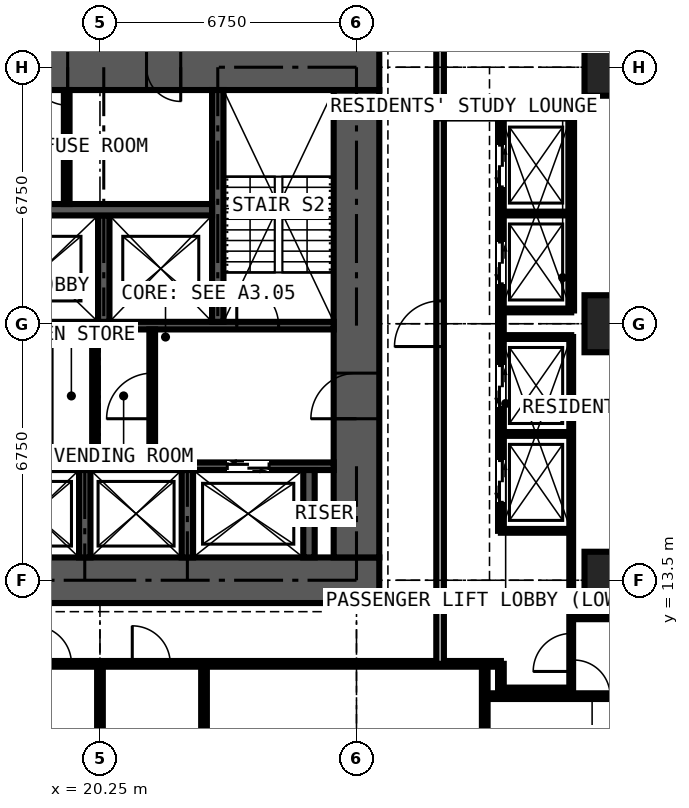
"""IFC4 building model, lengths in metres.
Left out: names, types, materials, properties, quantities, classifications, styles, units other than length and angle.
Written with IfcOpenShell. Run it as: python <this file> out.ifc"""

import sys

from ifc_helpers import new_model, si_unit, direction, frame, frame_2d, origin, origin_2d, place, context, subcontext, project, spatial, rectangle, extrude, element, fill, save


model = new_model("IFC4")
c1 = context("Model", 3, precision=1e-05, world=origin(), true_north=direction((0.0, 1.0)))
c2 = subcontext(c1, "Body", "Model", "MODEL_VIEW")
j1 = project(units=[si_unit("LENGTHUNIT", "METRE"), si_unit("PLANEANGLEUNIT", "RADIAN")], contexts=[c1])
p1 = place(None, origin())
s1 = spatial("IfcSite", under=j1, at=p1, CompositionType="ELEMENT")
p2 = place(p1, origin())
s2 = spatial("IfcBuilding", under=s1, at=p2, CompositionType="ELEMENT")
p3 = place(p2, frame((0.0, 0.0, 119.7)))
s3 = spatial("IfcBuildingStorey", under=s2, at=p3, CompositionType="ELEMENT", Elevation=119.7)
for number, where, z_axis, x_axis in (
    (1, (33.75, 13.5, 0.0), (0.0, 0.0, 1.0), (1.0, 0.0, 0.0)),
    (2, (33.75, 20.25, 0.0), (0.0, 0.0, 1.0), (1.0, 0.0, 0.0)),
    (3, (33.75, 27.0, 0.0), (0.0, 0.0, 1.0), (1.0, 0.0, 0.0)),
):
    element("IfcColumn", number, at=place(p3, frame(where, z_axis=z_axis, x_axis=x_axis)), inside=s3, PredefinedType="COLUMN", context=c2, shape_type="SweptSolid", body=[
        extrude(rectangle(XDim=1.5, YDim=1.5, at=origin_2d()), origin(), (0.0, 0.0, 1.0), 3.6),
    ])
p4 = place(p3, frame((12.9, 13.5, 0.0), z_axis=(0.0, 0.0, 1.0), x_axis=(1.0, 0.0, 0.0)))
e4 = element("IfcWall", 4, at=p4, inside=s3, PredefinedType="SHEAR", context=c2, shape_type="SweptSolid", body=[
    extrude(rectangle(XDim=14.7, YDim=1.2, at=frame_2d((7.35, 0.0))), origin(), (0.0, 0.0, 1.0), 3.6),
])
p5 = place(p3, frame((27.0, 14.1, 0.0), z_axis=(0.0, 0.0, 1.0), x_axis=(0.0, 1.0, 0.0)))
e5 = element("IfcWall", 5, at=p5, inside=s3, PredefinedType="SHEAR", context=c2, shape_type="SweptSolid", body=[
    extrude(rectangle(XDim=12.3, YDim=1.2, at=frame_2d((6.15, 0.0))), origin(), (0.0, 0.0, 1.0), 3.6),
])
p6 = place(p5, frame((3.65, 0.0, 0.0)))
e6 = element("IfcOpeningElement", 6, at=p6, cuts=e5, PredefinedType="OPENING", context=c2, shape_type="SweptSolid", body=[
    extrude(rectangle(XDim=1.2, YDim=2.2, at=frame_2d((0.6, 1.1))), frame((0.0, 0.61, 0.0), z_axis=(0.0, -1.0, 0.0), x_axis=(1.0, 0.0, 0.0)), (0.0, 0.0, 1.0), 1.22),
])
p7 = place(p3, frame((27.6, 27.0, 0.0), z_axis=(0.0, 0.0, 1.0), x_axis=(-1.0, 0.0, 0.0)))
e7 = element("IfcWall", 7, at=p7, inside=s3, PredefinedType="SHEAR", context=c2, shape_type="SweptSolid", body=[
    extrude(rectangle(XDim=14.7, YDim=1.2, at=frame_2d((7.35, 0.0))), origin(), (0.0, 0.0, 1.0), 3.6),
])
p8 = place(p7, frame((5.225, 0.0, 0.0)))
e8 = element("IfcOpeningElement", 8, at=p8, cuts=e7, PredefinedType="OPENING", context=c2, shape_type="SweptSolid", body=[
    extrude(rectangle(XDim=0.9, YDim=2.2, at=frame_2d((0.45, 1.1))), frame((0.0, 0.61, 0.0), z_axis=(0.0, -1.0, 0.0), x_axis=(1.0, 0.0, 0.0)), (0.0, 0.0, 1.0), 1.22),
])
p9 = place(p7, frame((8.2, 0.0, 0.0)))
e9 = element("IfcOpeningElement", 9, at=p9, cuts=e7, PredefinedType="OPENING", context=c2, shape_type="SweptSolid", body=[
    extrude(rectangle(XDim=1.0, YDim=2.2, at=frame_2d((0.5, 1.1))), frame((0.0, 0.61, 0.0), z_axis=(0.0, -1.0, 0.0), x_axis=(1.0, 0.0, 0.0)), (0.0, 0.0, 1.0), 1.22),
])
p10 = place(p3, frame((14.1, 16.5, 0.0), z_axis=(0.0, 0.0, 1.0), x_axis=(1.0, 0.0, 0.0)))
e10 = element("IfcWall", 10, at=p10, inside=s3, PredefinedType="SHEAR", context=c2, shape_type="SweptSolid", body=[
    extrude(rectangle(XDim=12.3, YDim=0.2, at=frame_2d((6.15, 0.0))), origin(), (0.0, 0.0, 1.0), 3.6),
])
p11 = place(p10, frame((0.9, 0.0, 0.0)))
e11 = element("IfcOpeningElement", 11, at=p11, cuts=e10, PredefinedType="OPENING", context=c2, shape_type="SweptSolid", body=[
    extrude(rectangle(XDim=1.1, YDim=2.2, at=frame_2d((0.55, 1.1))), frame((0.0, 0.11, 0.0), z_axis=(0.0, -1.0, 0.0), x_axis=(1.0, 0.0, 0.0)), (0.0, 0.0, 1.0), 0.22),
])
p12 = place(p10, frame((9.5, 0.0, 0.0)))
e12 = element("IfcOpeningElement", 12, at=p12, cuts=e10, PredefinedType="OPENING", context=c2, shape_type="SweptSolid", body=[
    extrude(rectangle(XDim=1.1, YDim=2.2, at=frame_2d((0.55, 1.1))), frame((0.0, 0.11, 0.0), z_axis=(0.0, -1.0, 0.0), x_axis=(1.0, 0.0, 0.0)), (0.0, 0.0, 1.0), 0.22),
])
p13 = place(p3, frame((14.1, 20.2, 0.0), z_axis=(0.0, 0.0, 1.0), x_axis=(1.0, 0.0, 0.0)))
e13 = element("IfcWall", 13, at=p13, inside=s3, PredefinedType="SHEAR", context=c2, shape_type="SweptSolid", body=[
    extrude(rectangle(XDim=12.3, YDim=0.2, at=frame_2d((6.15, 0.0))), origin(), (0.0, 0.0, 1.0), 3.6),
])
p14 = place(p13, frame((0.35, 0.0, 0.0)))
e14 = element("IfcOpeningElement", 14, at=p14, cuts=e13, PredefinedType="OPENING", context=c2, shape_type="SweptSolid", body=[
    extrude(rectangle(XDim=1.1, YDim=2.2, at=frame_2d((0.55, 1.1))), frame((0.0, 0.11, 0.0), z_axis=(0.0, -1.0, 0.0), x_axis=(1.0, 0.0, 0.0)), (0.0, 0.0, 1.0), 0.22),
])
p15 = place(p13, frame((9.75, 0.0, 0.0)))
e15 = element("IfcOpeningElement", 15, at=p15, cuts=e13, PredefinedType="OPENING", context=c2, shape_type="SweptSolid", body=[
    extrude(rectangle(XDim=1.1, YDim=2.2, at=frame_2d((0.55, 1.1))), frame((0.0, 0.11, 0.0), z_axis=(0.0, -1.0, 0.0), x_axis=(1.0, 0.0, 0.0)), (0.0, 0.0, 1.0), 0.22),
])
p16 = place(p3, frame((23.35, 20.3, 0.0), z_axis=(0.0, 0.0, 1.0), x_axis=(0.0, 1.0, 0.0)))
e16 = element("IfcWall", 16, at=p16, inside=s3, PredefinedType="SHEAR", context=c2, shape_type="SweptSolid", body=[
    extrude(rectangle(XDim=6.1, YDim=0.3, at=frame_2d((3.05, 0.0))), origin(), (0.0, 0.0, 1.0), 3.6),
])
p17 = place(p3, frame((20.35, 20.3, 0.0), z_axis=(0.0, 0.0, 1.0), x_axis=(0.0, 1.0, 0.0)))
e17 = element("IfcWall", 17, at=p17, inside=s3, PredefinedType="SHEAR", context=c2, shape_type="SweptSolid", body=[
    extrude(rectangle(XDim=2.8, YDim=0.3, at=frame_2d((1.4, 0.0))), origin(), (0.0, 0.0, 1.0), 3.6),
])
p18 = place(p3, frame((17.3, 23.25, 0.0), z_axis=(0.0, 0.0, 1.0), x_axis=(1.0, 0.0, 0.0)))
e18 = element("IfcWall", 18, at=p18, inside=s3, PredefinedType="SHEAR", context=c2, shape_type="SweptSolid", body=[
    extrude(rectangle(XDim=5.9, YDim=0.3, at=frame_2d((2.95, 0.0))), origin(), (0.0, 0.0, 1.0), 3.6),
])
for number, where, z_axis, x_axis in (
    (19, (19.85, 14.1, 0.0), (0.0, 0.0, 1.0), (0.0, 1.0, 0.0)),
    (20, (22.55, 14.1, 0.0), (0.0, 0.0, 1.0), (0.0, 1.0, 0.0)),
    (21, (25.75, 14.1, 0.0), (0.0, 0.0, 1.0), (0.0, 1.0, 0.0)),
):
    element("IfcWall", number, at=place(p3, frame(where, z_axis=z_axis, x_axis=x_axis)), inside=s3, PredefinedType="SHEAR", context=c2, shape_type="SweptSolid", body=[
        extrude(rectangle(XDim=2.3, YDim=0.3, at=frame_2d((1.15, 0.0))), origin(), (0.0, 0.0, 1.0), 3.6),
    ])
p19 = place(p3, frame((21.625, 16.6, 0.0), z_axis=(0.0, 0.0, 1.0), x_axis=(0.0, 1.0, 0.0)))
e22 = element("IfcWall", 22, at=p19, inside=s3, PredefinedType="PARTITIONING", context=c2, shape_type="SweptSolid", body=[
    extrude(rectangle(XDim=3.5, YDim=0.15, at=frame_2d((1.75, 0.0))), origin(), (0.0, 0.0, 1.0), 3.375),
])
p20 = place(p19, frame((1.15, 0.0, 0.0)))
e23 = element("IfcOpeningElement", 23, at=p20, cuts=e22, PredefinedType="OPENING", context=c2, shape_type="SweptSolid", body=[
    extrude(rectangle(XDim=1.2, YDim=2.2, at=frame_2d((0.6, 1.1))), frame((0.0, 0.085, 0.0), z_axis=(0.0, -1.0, 0.0), x_axis=(1.0, 0.0, 0.0)), (0.0, 0.0, 1.0), 0.17),
])
p21 = place(p3, frame((20.12, 16.6, 0.0), z_axis=(0.0, 0.0, 1.0), x_axis=(0.0, 1.0, 0.0)))
e24 = element("IfcWall", 24, at=p21, inside=s3, PredefinedType="PARTITIONING", context=c2, shape_type="SweptSolid", body=[
    extrude(rectangle(XDim=3.5, YDim=0.15, at=frame_2d((1.75, 0.0))), origin(), (0.0, 0.0, 1.0), 3.375),
])
p22 = place(p3, frame((19.375, 23.4, 0.0), z_axis=(0.0, 0.0, 1.0), x_axis=(0.0, 1.0, 0.0)))
e25 = element("IfcWall", 25, at=p22, inside=s3, PredefinedType="PARTITIONING", context=c2, shape_type="SweptSolid", body=[
    extrude(rectangle(XDim=3.0, YDim=0.15, at=frame_2d((1.5, 0.0))), origin(), (0.0, 0.0, 1.0), 3.375),
])
p23 = place(p3, frame((10.125, 11.3, 0.0), z_axis=(0.0, 0.0, 1.0), x_axis=(1.0, 0.0, 0.0)))
e26 = element("IfcWall", 26, at=p23, inside=s3, PredefinedType="PARTITIONING", context=c2, shape_type="SweptSolid", body=[
    extrude(rectangle(XDim=20.675, YDim=0.15, at=frame_2d((10.337, 0.0))), origin(), (0.0, 0.0, 1.0), 3.375),
])
p24 = place(p23, frame((8.375, 0.0, 0.0)))
e27 = element("IfcOpeningElement", 27, at=p24, cuts=e26, PredefinedType="OPENING", context=c2, shape_type="SweptSolid", body=[
    extrude(rectangle(XDim=1.0, YDim=2.2, at=frame_2d((0.5, 1.1))), frame((0.0, 0.085, 0.0), z_axis=(0.0, -1.0, 0.0), x_axis=(1.0, 0.0, 0.0)), (0.0, 0.0, 1.0), 0.17),
])
p25 = place(p23, frame((10.975, 0.0, 0.0)))
e28 = element("IfcOpeningElement", 28, at=p25, cuts=e26, PredefinedType="OPENING", context=c2, shape_type="SweptSolid", body=[
    extrude(rectangle(XDim=1.0, YDim=2.2, at=frame_2d((0.5, 1.1))), frame((0.0, 0.085, 0.0), z_axis=(0.0, -1.0, 0.0), x_axis=(1.0, 0.0, 0.0)), (0.0, 0.0, 1.0), 0.17),
])
p26 = place(p23, frame((3.925, 0.0, 0.0)))
e29 = element("IfcOpeningElement", 29, at=p26, cuts=e26, PredefinedType="OPENING", context=c2, shape_type="SweptSolid", body=[
    extrude(rectangle(XDim=0.95, YDim=2.2, at=frame_2d((0.475, 1.1))), frame((0.0, 0.085, 0.0), z_axis=(0.0, -1.0, 0.0), x_axis=(1.0, 0.0, 0.0)), (0.0, 0.0, 1.0), 0.17),
])
p27 = place(p3, frame((20.25, -0.734, 0.0), z_axis=(0.0, 0.0, 1.0), x_axis=(0.0, 1.0, 0.0)))
e30 = element("IfcWall", 30, at=p27, inside=s3, PredefinedType="PARTITIONING", context=c2, shape_type="SweptSolid", body=[
    extrude(rectangle(XDim=12.034, YDim=0.15, at=frame_2d((6.017, 0.0))), origin(), (0.0, 0.0, 1.0), 2.61),
])
p28 = place(p3, frame((22.988, 4.85, 0.0), z_axis=(0.0, 0.0, 1.0), x_axis=(0.0, 1.0, 0.0)))
e31 = element("IfcWall", 31, at=p28, inside=s3, PredefinedType="PARTITIONING", context=c2, shape_type="SweptSolid", body=[
    extrude(rectangle(XDim=6.45, YDim=0.15, at=frame_2d((3.225, 0.0))), origin(), (0.0, 0.0, 1.0), 3.375),
])
p29 = place(p28, frame((2.75, 0.0, 0.0)))
e32 = element("IfcOpeningElement", 32, at=p29, cuts=e31, PredefinedType="OPENING", context=c2, shape_type="SweptSolid", body=[
    extrude(rectangle(XDim=0.95, YDim=2.2, at=frame_2d((0.475, 1.1))), frame((0.0, 0.085, 0.0), z_axis=(0.0, -1.0, 0.0), x_axis=(1.0, 0.0, 0.0)), (0.0, 0.0, 1.0), 0.17),
])
p30 = place(p3, frame((29.2, 11.3, 0.0), z_axis=(0.0, 0.0, 1.0), x_axis=(0.0, 1.0, 0.0)))
e33 = element("IfcWall", 33, at=p30, inside=s3, PredefinedType="PARTITIONING", context=c2, shape_type="SweptSolid", body=[
    extrude(rectangle(XDim=17.9, YDim=0.2, at=frame_2d((8.95, 0.0))), origin(), (0.0, 0.0, 1.0), 3.375),
])
p31 = place(p30, frame((8.35, 0.0, 0.0)))
e34 = element("IfcOpeningElement", 34, at=p31, cuts=e33, PredefinedType="OPENING", context=c2, shape_type="SweptSolid", body=[
    extrude(rectangle(XDim=1.2, YDim=2.2, at=frame_2d((0.6, 1.1))), frame((0.0, 0.11, 0.0), z_axis=(0.0, -1.0, 0.0), x_axis=(1.0, 0.0, 0.0)), (0.0, 0.0, 1.0), 0.22),
])
p32 = place(p3, frame((29.2, 25.7, 0.0), z_axis=(0.0, 0.0, 1.0), x_axis=(1.0, 0.0, 0.0)))
e35 = element("IfcWall", 35, at=p32, inside=s3, PredefinedType="SHEAR", context=c2, shape_type="SweptSolid", body=[
    extrude(rectangle(XDim=3.45, YDim=0.1, at=frame_2d((1.725, 0.0))), origin(), (0.0, 0.0, 1.0), 3.375),
])
p33 = place(p3, frame((30.375, -0.734, 0.0), z_axis=(0.0, 0.0, 1.0), x_axis=(0.0, 1.0, 0.0)))
e36 = element("IfcWall", 36, at=p33, inside=s3, PredefinedType="PARTITIONING", context=c2, shape_type="SweptSolid", body=[
    extrude(rectangle(XDim=12.034, YDim=0.15, at=frame_2d((6.017, 0.0))), origin(), (0.0, 0.0, 1.0), 3.375),
])
p34 = place(p33, frame((4.884, 0.0, 0.0)))
e37 = element("IfcOpeningElement", 37, at=p34, cuts=e36, PredefinedType="OPENING", context=c2, shape_type="SweptSolid", body=[
    extrude(rectangle(XDim=1.0, YDim=2.2, at=frame_2d((0.5, 1.1))), frame((0.0, 0.085, 0.0), z_axis=(0.0, -1.0, 0.0), x_axis=(1.0, 0.0, 0.0)), (0.0, 0.0, 1.0), 0.17),
])
p35 = place(p3, frame((30.375, 10.45, 0.0), z_axis=(0.0, 0.0, 1.0), x_axis=(1.0, 0.0, 0.0)))
e38 = element("IfcWall", 38, at=p35, inside=s3, PredefinedType="PARTITIONING", context=c2, shape_type="SweptSolid", body=[
    extrude(rectangle(XDim=5.275, YDim=0.15, at=frame_2d((2.637, 0.0))), origin(), (0.0, 0.0, 1.0), 3.375),
])
p36 = place(p35, frame((2.35, 0.0, 0.0)))
e39 = element("IfcOpeningElement", 39, at=p36, cuts=e38, PredefinedType="OPENING", context=c2, shape_type="SweptSolid", body=[
    extrude(rectangle(XDim=0.95, YDim=2.2, at=frame_2d((0.475, 1.1))), frame((0.0, 0.085, 0.0), z_axis=(0.0, -1.0, 0.0), x_axis=(1.0, 0.0, 0.0)), (0.0, 0.0, 1.0), 0.17),
])
p37 = place(p3, frame((30.8, 10.6, 0.0), z_axis=(0.0, 0.0, 1.0), x_axis=(0.0, 1.0, 0.0)))
e40 = element("IfcWall", 40, at=p37, inside=s3, PredefinedType="PARTITIONING", context=c2, shape_type="SweptSolid", body=[
    extrude(rectangle(XDim=0.7, YDim=0.15, at=frame_2d((0.35, 0.0))), origin(), (0.0, 0.0, 1.0), 3.375),
])
p38 = place(p3, frame((30.8, 10.6, 0.0), z_axis=(0.0, 0.0, 1.0), x_axis=(1.0, 0.0, 0.0)))
e41 = element("IfcWall", 41, at=p38, inside=s3, PredefinedType="PARTITIONING", context=c2, shape_type="SweptSolid", body=[
    extrude(rectangle(XDim=1.85, YDim=0.15, at=frame_2d((0.925, 0.0))), origin(), (0.0, 0.0, 1.0), 3.375),
])
p39 = place(p3, frame((30.8, 14.8, 0.0), z_axis=(0.0, 0.0, 1.0), x_axis=(0.0, 1.0, 0.0)))
e42 = element("IfcWall", 42, at=p39, inside=s3, PredefinedType="PARTITIONING", context=c2, shape_type="SweptSolid", body=[
    extrude(rectangle(XDim=10.9, YDim=0.15, at=frame_2d((5.45, 0.0))), origin(), (0.0, 0.0, 1.0), 3.375),
])
p40 = place(p39, frame((0.75, 0.0, 0.0)))
e43 = element("IfcOpeningElement", 43, at=p40, cuts=e42, PredefinedType="OPENING", context=c2, shape_type="SweptSolid", body=[
    extrude(rectangle(XDim=1.1, YDim=2.2, at=frame_2d((0.55, 1.1))), frame((0.0, 0.085, 0.0), z_axis=(0.0, -1.0, 0.0), x_axis=(1.0, 0.0, 0.0)), (0.0, 0.0, 1.0), 0.17),
])
p41 = place(p39, frame((3.25, 0.0, 0.0)))
e44 = element("IfcOpeningElement", 44, at=p41, cuts=e42, PredefinedType="OPENING", context=c2, shape_type="SweptSolid", body=[
    extrude(rectangle(XDim=1.1, YDim=2.2, at=frame_2d((0.55, 1.1))), frame((0.0, 0.085, 0.0), z_axis=(0.0, -1.0, 0.0), x_axis=(1.0, 0.0, 0.0)), (0.0, 0.0, 1.0), 0.17),
])
p42 = place(p39, frame((6.5, 0.0, 0.0)))
e45 = element("IfcOpeningElement", 45, at=p42, cuts=e42, PredefinedType="OPENING", context=c2, shape_type="SweptSolid", body=[
    extrude(rectangle(XDim=1.1, YDim=2.2, at=frame_2d((0.55, 1.1))), frame((0.0, 0.085, 0.0), z_axis=(0.0, -1.0, 0.0), x_axis=(1.0, 0.0, 0.0)), (0.0, 0.0, 1.0), 0.17),
])
p43 = place(p39, frame((9.05, 0.0, 0.0)))
e46 = element("IfcOpeningElement", 46, at=p43, cuts=e42, PredefinedType="OPENING", context=c2, shape_type="SweptSolid", body=[
    extrude(rectangle(XDim=1.1, YDim=2.2, at=frame_2d((0.55, 1.1))), frame((0.0, 0.085, 0.0), z_axis=(0.0, -1.0, 0.0), x_axis=(1.0, 0.0, 0.0)), (0.0, 0.0, 1.0), 0.17),
])
for number, where, z_axis, x_axis in (
    (47, (30.8, 14.8, 0.0), (0.0, 0.0, 1.0), (1.0, 0.0, 0.0)),
    (48, (30.8, 17.35, 0.0), (0.0, 0.0, 1.0), (1.0, 0.0, 0.0)),
    (49, (30.8, 19.9, 0.0), (0.0, 0.0, 1.0), (1.0, 0.0, 0.0)),
    (50, (30.8, 20.6, 0.0), (0.0, 0.0, 1.0), (1.0, 0.0, 0.0)),
    (51, (30.8, 23.15, 0.0), (0.0, 0.0, 1.0), (1.0, 0.0, 0.0)),
):
    element("IfcWall", number, at=place(p3, frame(where, z_axis=z_axis, x_axis=x_axis)), inside=s3, PredefinedType="SHEAR", context=c2, shape_type="SweptSolid", body=[
        extrude(rectangle(XDim=1.85, YDim=0.1, at=frame_2d((0.925, 0.0))), origin(), (0.0, 0.0, 1.0), 3.375),
    ])
p44 = place(p3, frame((32.65, 10.6, 0.0), z_axis=(0.0, 0.0, 1.0), x_axis=(0.0, 1.0, 0.0)))
e52 = element("IfcWall", 52, at=p44, inside=s3, PredefinedType="SHEAR", context=c2, shape_type="SweptSolid", body=[
    extrude(rectangle(XDim=9.3, YDim=0.1, at=frame_2d((4.65, 0.0))), origin(), (0.0, 0.0, 1.0), 3.375),
])
p45 = place(p44, frame((0.5, 0.0, 0.0)))
e53 = element("IfcOpeningElement", 53, at=p45, cuts=e52, PredefinedType="OPENING", context=c2, shape_type="SweptSolid", body=[
    extrude(rectangle(XDim=1.0, YDim=2.2, at=frame_2d((0.5, 1.1))), frame((0.0, 0.06, 0.0), z_axis=(0.0, -1.0, 0.0), x_axis=(1.0, 0.0, 0.0)), (0.0, 0.0, 1.0), 0.12),
])
p46 = place(p3, frame((32.65, 12.55, 0.0), z_axis=(0.0, 0.0, 1.0), x_axis=(1.0, 0.0, 0.0)))
e54 = element("IfcWall", 54, at=p46, inside=s3, PredefinedType="PARTITIONING", context=c2, shape_type="SweptSolid", body=[
    extrude(rectangle(XDim=3.0, YDim=0.15, at=frame_2d((1.5, 0.0))), origin(), (0.0, 0.0, 1.0), 3.375),
])
p47 = place(p3, frame((32.65, 20.6, 0.0), z_axis=(0.0, 0.0, 1.0), x_axis=(0.0, 1.0, 0.0)))
e55 = element("IfcWall", 55, at=p47, inside=s3, PredefinedType="PARTITIONING", context=c2, shape_type="SweptSolid", body=[
    extrude(rectangle(XDim=5.1, YDim=0.15, at=frame_2d((2.55, 0.0))), origin(), (0.0, 0.0, 1.0), 3.375),
])
p48 = place(p12, origin())
e56 = element("IfcDoor", 56, at=p48, inside=s3, OperationType="DOUBLE_DOOR_SLIDING", PredefinedType="DOOR", context=c2, shape_type="SweptSolid", body=[
    extrude(rectangle(XDim=1.1, YDim=2.2, at=frame_2d((0.55, 1.1))), frame((0.0, 0.025, 0.0), z_axis=(0.0, -1.0, 0.0), x_axis=(1.0, 0.0, 0.0)), (0.0, 0.0, 1.0), 0.05),
])
fill(e12, e56)
p49 = place(p6, origin())
e57 = element("IfcDoor", 57, at=p49, inside=s3, OperationType="DOUBLE_DOOR_SINGLE_SWING", PredefinedType="DOOR", context=c2, shape_type="SweptSolid", body=[
    extrude(rectangle(XDim=1.2, YDim=2.2, at=frame_2d((0.6, 1.1))), frame((0.0, 0.025, 0.0), z_axis=(0.0, -1.0, 0.0), x_axis=(1.0, 0.0, 0.0)), (0.0, 0.0, 1.0), 0.05),
])
fill(e6, e57)
p50 = place(p20, origin())
e58 = element("IfcDoor", 58, at=p50, inside=s3, OperationType="DOUBLE_DOOR_SINGLE_SWING", PredefinedType="DOOR", context=c2, shape_type="SweptSolid", body=[
    extrude(rectangle(XDim=1.2, YDim=2.2, at=frame_2d((0.6, 1.1))), frame((0.0, 0.025, 0.0), z_axis=(0.0, -1.0, 0.0), x_axis=(1.0, 0.0, 0.0)), (0.0, 0.0, 1.0), 0.05),
])
fill(e23, e58)
p51 = place(p8, origin())
e59 = element("IfcDoor", 59, at=p51, inside=s3, OperationType="SINGLE_SWING_LEFT", PredefinedType="DOOR", context=c2, shape_type="SweptSolid", body=[
    extrude(rectangle(XDim=0.9, YDim=2.2, at=frame_2d((0.45, 1.1))), frame((0.0, 0.4, 0.0), z_axis=(0.0, -1.0, 0.0), x_axis=(1.0, 0.0, 0.0)), (0.0, 0.0, 1.0), 0.8),
])
fill(e8, e59)
p52 = place(p9, origin())
e60 = element("IfcDoor", 60, at=p52, inside=s3, OperationType="SINGLE_SWING_LEFT", PredefinedType="DOOR", context=c2, shape_type="SweptSolid", body=[
    extrude(rectangle(XDim=1.0, YDim=2.2, at=frame_2d((0.5, 1.1))), frame((0.0, 0.025, 0.0), z_axis=(0.0, -1.0, 0.0), x_axis=(1.0, 0.0, 0.0)), (0.0, 0.0, 1.0), 0.05),
])
fill(e9, e60)
p53 = place(p15, origin())
e61 = element("IfcDoor", 61, at=p53, inside=s3, OperationType="SINGLE_SWING_LEFT", PredefinedType="DOOR", context=c2, shape_type="SweptSolid", body=[
    extrude(rectangle(XDim=1.1, YDim=2.2, at=frame_2d((0.55, 1.1))), frame((0.0, 0.025, 0.0), z_axis=(0.0, -1.0, 0.0), x_axis=(1.0, 0.0, 0.0)), (0.0, 0.0, 1.0), 0.05),
])
fill(e15, e61)
p54 = place(p24, origin())
e62 = element("IfcDoor", 62, at=p54, inside=s3, OperationType="SINGLE_SWING_LEFT", PredefinedType="DOOR", context=c2, shape_type="SweptSolid", body=[
    extrude(rectangle(XDim=1.0, YDim=2.2, at=frame_2d((0.5, 1.1))), frame((0.0, 0.025, 0.0), z_axis=(0.0, -1.0, 0.0), x_axis=(1.0, 0.0, 0.0)), (0.0, 0.0, 1.0), 0.05),
])
fill(e27, e62)
p55 = place(p25, origin())
e63 = element("IfcDoor", 63, at=p55, inside=s3, OperationType="SINGLE_SWING_LEFT", PredefinedType="DOOR", context=c2, shape_type="SweptSolid", body=[
    extrude(rectangle(XDim=1.0, YDim=2.2, at=frame_2d((0.5, 1.1))), frame((0.0, 0.025, 0.0), z_axis=(0.0, -1.0, 0.0), x_axis=(1.0, 0.0, 0.0)), (0.0, 0.0, 1.0), 0.05),
])
fill(e28, e63)
p56 = place(p45, origin())
e64 = element("IfcDoor", 64, at=p56, inside=s3, OperationType="SINGLE_SWING_LEFT", PredefinedType="DOOR", context=c2, shape_type="SweptSolid", body=[
    extrude(rectangle(XDim=1.0, YDim=2.2, at=frame_2d((0.5, 1.1))), frame((0.0, 0.025, 0.0), z_axis=(0.0, -1.0, 0.0), x_axis=(1.0, 0.0, 0.0)), (0.0, 0.0, 1.0), 0.05),
])
fill(e53, e64)
p57 = place(p36, origin())
e65 = element("IfcDoor", 65, at=p57, inside=s3, OperationType="SINGLE_SWING_LEFT", PredefinedType="DOOR", context=c2, shape_type="SweptSolid", body=[
    extrude(rectangle(XDim=0.95, YDim=2.2, at=frame_2d((0.475, 1.1))), frame((0.0, 0.025, 0.0), z_axis=(0.0, -1.0, 0.0), x_axis=(1.0, 0.0, 0.0)), (0.0, 0.0, 1.0), 0.05),
])
fill(e39, e65)
p58 = place(p40, origin())
e66 = element("IfcDoor", 66, at=p58, inside=s3, OperationType="DOUBLE_DOOR_SLIDING", PredefinedType="DOOR", context=c2, shape_type="SweptSolid", body=[
    extrude(rectangle(XDim=1.1, YDim=2.2, at=frame_2d((0.55, 1.1))), frame((0.0, 0.025, 0.0), z_axis=(0.0, -1.0, 0.0), x_axis=(1.0, 0.0, 0.0)), (0.0, 0.0, 1.0), 0.05),
])
fill(e43, e66)
p59 = place(p41, origin())
e67 = element("IfcDoor", 67, at=p59, inside=s3, OperationType="DOUBLE_DOOR_SLIDING", PredefinedType="DOOR", context=c2, shape_type="SweptSolid", body=[
    extrude(rectangle(XDim=1.1, YDim=2.2, at=frame_2d((0.55, 1.1))), frame((0.0, 0.025, 0.0), z_axis=(0.0, -1.0, 0.0), x_axis=(1.0, 0.0, 0.0)), (0.0, 0.0, 1.0), 0.05),
])
fill(e44, e67)
p60 = place(p42, origin())
e68 = element("IfcDoor", 68, at=p60, inside=s3, OperationType="DOUBLE_DOOR_SLIDING", PredefinedType="DOOR", context=c2, shape_type="SweptSolid", body=[
    extrude(rectangle(XDim=1.1, YDim=2.2, at=frame_2d((0.55, 1.1))), frame((0.0, 0.025, 0.0), z_axis=(0.0, -1.0, 0.0), x_axis=(1.0, 0.0, 0.0)), (0.0, 0.0, 1.0), 0.05),
])
fill(e45, e68)
p61 = place(p43, origin())
e69 = element("IfcDoor", 69, at=p61, inside=s3, OperationType="DOUBLE_DOOR_SLIDING", PredefinedType="DOOR", context=c2, shape_type="SweptSolid", body=[
    extrude(rectangle(XDim=1.1, YDim=2.2, at=frame_2d((0.55, 1.1))), frame((0.0, 0.025, 0.0), z_axis=(0.0, -1.0, 0.0), x_axis=(1.0, 0.0, 0.0)), (0.0, 0.0, 1.0), 0.05),
])
fill(e46, e69)
p62 = place(p31, origin())
e70 = element("IfcDoor", 70, at=p62, inside=s3, OperationType="DOUBLE_DOOR_SINGLE_SWING", PredefinedType="DOOR", context=c2, shape_type="SweptSolid", body=[
    extrude(rectangle(XDim=1.2, YDim=2.2, at=frame_2d((0.6, 1.1))), frame((0.0, 0.025, 0.0), z_axis=(0.0, -1.0, 0.0), x_axis=(1.0, 0.0, 0.0)), (0.0, 0.0, 1.0), 0.05),
])
fill(e34, e70)
save(model, sys.argv[1])
